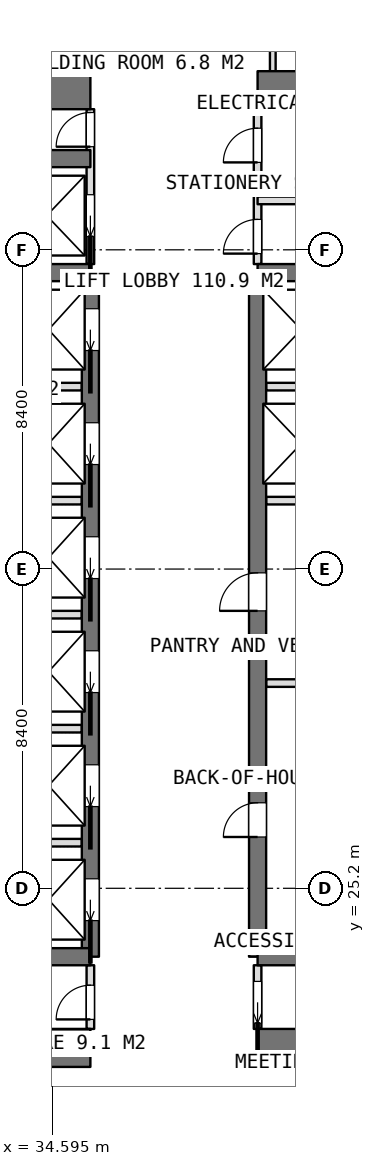
"""IFC4 building model, lengths in metres.
Left out: names, types, materials, properties, quantities, classifications, styles, units other than length and angle.
Written with IfcOpenShell. Run it as: python <this file> out.ifc"""

import sys

from ifc_helpers import new_model, si_unit, direction, frame, frame_2d, origin, place, context, subcontext, project, spatial, rectangle, extrude, element, fill, save


model = new_model("IFC4")
c1 = context("Model", 3, precision=1e-05, world=origin(), true_north=direction((0.0, 1.0)))
c2 = subcontext(c1, "Body", "Model", "MODEL_VIEW")
j1 = project(units=[si_unit("LENGTHUNIT", "METRE"), si_unit("PLANEANGLEUNIT", "RADIAN")], contexts=[c1])
p1 = place(None, origin())
s1 = spatial("IfcSite", under=j1, at=p1, CompositionType="ELEMENT")
p2 = place(p1, origin())
s2 = spatial("IfcBuilding", under=s1, at=p2, CompositionType="ELEMENT")
p3 = place(p2, frame((0.0, 0.0, 221.45)))
s3 = spatial("IfcBuildingStorey", under=s2, at=p3, CompositionType="ELEMENT", Elevation=221.45)
p4 = place(p3, frame((25.2, 21.0, 0.0), z_axis=(0.0, 0.0, 1.0), x_axis=(1.0, 0.0, 0.0)))
e1 = element("IfcWall", 1, at=p4, inside=s3, PredefinedType="SHEAR", context=c2, shape_type="SweptSolid", body=[
    extrude(rectangle(XDim=10.4, YDim=1.0, at=frame_2d((5.2, 0.0))), origin(), (0.0, 0.0, 1.0), 3.75),
])
p5 = place(p3, frame((40.0, 21.0, 0.0), z_axis=(0.0, 0.0, 1.0), x_axis=(1.0, 0.0, 0.0)))
e2 = element("IfcWall", 2, at=p5, inside=s3, PredefinedType="SHEAR", context=c2, shape_type="SweptSolid", body=[
    extrude(rectangle(XDim=10.4, YDim=1.0, at=frame_2d((5.2, 0.0))), origin(), (0.0, 0.0, 1.0), 3.75),
])
p6 = place(p3, frame((25.2, 46.2, 0.0), z_axis=(0.0, 0.0, 1.0), x_axis=(1.0, 0.0, 0.0)))
e3 = element("IfcWall", 3, at=p6, inside=s3, PredefinedType="SHEAR", context=c2, shape_type="SweptSolid", body=[
    extrude(rectangle(XDim=10.4, YDim=1.0, at=frame_2d((5.2, 0.0))), origin(), (0.0, 0.0, 1.0), 3.75),
])
p7 = place(p3, frame((40.0, 46.2, 0.0), z_axis=(0.0, 0.0, 1.0), x_axis=(1.0, 0.0, 0.0)))
e4 = element("IfcWall", 4, at=p7, inside=s3, PredefinedType="SHEAR", context=c2, shape_type="SweptSolid", body=[
    extrude(rectangle(XDim=10.4, YDim=1.0, at=frame_2d((5.2, 0.0))), origin(), (0.0, 0.0, 1.0), 3.75),
])
p8 = place(p3, frame((35.6, 23.4, 0.0), z_axis=(0.0, 0.0, 1.0), x_axis=(0.0, 1.0, 0.0)))
e5 = element("IfcWall", 5, at=p8, inside=s3, PredefinedType="SHEAR", context=c2, shape_type="SweptSolid", body=[
    extrude(rectangle(XDim=18.0, YDim=0.45, at=frame_2d((9.0, 0.0))), origin(), (0.0, 0.0, 1.0), 3.75),
])
p9 = place(p8, frame((0.95, 0.0, 0.0)))
e6 = element("IfcOpeningElement", 6, at=p9, cuts=e5, PredefinedType="OPENING", context=c2, shape_type="SweptSolid", body=[
    extrude(rectangle(XDim=1.1, YDim=2.1, at=frame_2d((0.55, 1.05))), frame((0.0, 0.235, 0.0), z_axis=(0.0, -1.0, 0.0), x_axis=(1.0, 0.0, 0.0)), (0.0, 0.0, 1.0), 0.47),
])
p10 = place(p8, frame((3.95, 0.0, 0.0)))
e7 = element("IfcOpeningElement", 7, at=p10, cuts=e5, PredefinedType="OPENING", context=c2, shape_type="SweptSolid", body=[
    extrude(rectangle(XDim=1.1, YDim=2.1, at=frame_2d((0.55, 1.05))), frame((0.0, 0.235, 0.0), z_axis=(0.0, -1.0, 0.0), x_axis=(1.0, 0.0, 0.0)), (0.0, 0.0, 1.0), 0.47),
])
p11 = place(p8, frame((6.95, 0.0, 0.0)))
e8 = element("IfcOpeningElement", 8, at=p11, cuts=e5, PredefinedType="OPENING", context=c2, shape_type="SweptSolid", body=[
    extrude(rectangle(XDim=1.1, YDim=2.1, at=frame_2d((0.55, 1.05))), frame((0.0, 0.235, 0.0), z_axis=(0.0, -1.0, 0.0), x_axis=(1.0, 0.0, 0.0)), (0.0, 0.0, 1.0), 0.47),
])
p12 = place(p8, frame((9.95, 0.0, 0.0)))
e9 = element("IfcOpeningElement", 9, at=p12, cuts=e5, PredefinedType="OPENING", context=c2, shape_type="SweptSolid", body=[
    extrude(rectangle(XDim=1.1, YDim=2.1, at=frame_2d((0.55, 1.05))), frame((0.0, 0.235, 0.0), z_axis=(0.0, -1.0, 0.0), x_axis=(1.0, 0.0, 0.0)), (0.0, 0.0, 1.0), 0.47),
])
p13 = place(p8, frame((12.95, 0.0, 0.0)))
e10 = element("IfcOpeningElement", 10, at=p13, cuts=e5, PredefinedType="OPENING", context=c2, shape_type="SweptSolid", body=[
    extrude(rectangle(XDim=1.1, YDim=2.1, at=frame_2d((0.55, 1.05))), frame((0.0, 0.235, 0.0), z_axis=(0.0, -1.0, 0.0), x_axis=(1.0, 0.0, 0.0)), (0.0, 0.0, 1.0), 0.47),
])
p14 = place(p8, frame((15.95, 0.0, 0.0)))
e11 = element("IfcOpeningElement", 11, at=p14, cuts=e5, PredefinedType="OPENING", context=c2, shape_type="SweptSolid", body=[
    extrude(rectangle(XDim=1.1, YDim=2.1, at=frame_2d((0.55, 1.05))), frame((0.0, 0.235, 0.0), z_axis=(0.0, -1.0, 0.0), x_axis=(1.0, 0.0, 0.0)), (0.0, 0.0, 1.0), 0.47),
])
p15 = place(p3, frame((40.0, 23.4, 0.0), z_axis=(0.0, 0.0, 1.0), x_axis=(0.0, 1.0, 0.0)))
e12 = element("IfcWall", 12, at=p15, inside=s3, PredefinedType="SHEAR", context=c2, shape_type="SweptSolid", body=[
    extrude(rectangle(XDim=18.0, YDim=0.45, at=frame_2d((9.0, 0.0))), origin(), (0.0, 0.0, 1.0), 3.75),
])
p16 = place(p15, frame((3.15, 0.0, 0.0)))
e13 = element("IfcOpeningElement", 13, at=p16, cuts=e12, PredefinedType="OPENING", context=c2, shape_type="SweptSolid", body=[
    extrude(rectangle(XDim=0.9, YDim=2.1, at=frame_2d((0.45, 1.05))), frame((0.0, 0.235, 0.0), z_axis=(0.0, -1.0, 0.0), x_axis=(1.0, 0.0, 0.0)), (0.0, 0.0, 1.0), 0.47),
])
p17 = place(p15, frame((9.1, 0.0, 0.0)))
e14 = element("IfcOpeningElement", 14, at=p17, cuts=e12, PredefinedType="OPENING", context=c2, shape_type="SweptSolid", body=[
    extrude(rectangle(XDim=1.0, YDim=2.1, at=frame_2d((0.5, 1.05))), frame((0.0, 0.235, 0.0), z_axis=(0.0, -1.0, 0.0), x_axis=(1.0, 0.0, 0.0)), (0.0, 0.0, 1.0), 0.47),
])
for number, where, z_axis, x_axis in (
    (15, (31.8, 23.4, 0.0), (0.0, 0.0, 1.0), (1.0, 0.0, 0.0)),
    (16, (31.8, 41.4, 0.0), (0.0, 0.0, 1.0), (1.0, 0.0, 0.0)),
    (17, (31.8, 44.4, 0.0), (0.0, 0.0, 1.0), (1.0, 0.0, 0.0)),
    (18, (40.0, 23.4, 0.0), (0.0, 0.0, 1.0), (1.0, 0.0, 0.0)),
    (19, (40.0, 41.4, 0.0), (0.0, 0.0, 1.0), (1.0, 0.0, 0.0)),
):
    element("IfcWall", number, at=place(p3, frame(where, z_axis=z_axis, x_axis=x_axis)), inside=s3, PredefinedType="SHEAR", context=c2, shape_type="SweptSolid", body=[
        extrude(rectangle(XDim=3.8, YDim=0.45, at=frame_2d((1.9, 0.0))), origin(), (0.0, 0.0, 1.0), 3.75),
    ])
for number, where, z_axis, x_axis in (
    (20, (32.025, 26.4, 0.0), (0.0, 0.0, 1.0), (1.0, 0.0, 0.0)),
    (21, (32.025, 29.4, 0.0), (0.0, 0.0, 1.0), (1.0, 0.0, 0.0)),
    (22, (32.025, 32.4, 0.0), (0.0, 0.0, 1.0), (1.0, 0.0, 0.0)),
    (23, (32.025, 35.4, 0.0), (0.0, 0.0, 1.0), (1.0, 0.0, 0.0)),
    (24, (32.025, 38.4, 0.0), (0.0, 0.0, 1.0), (1.0, 0.0, 0.0)),
):
    element("IfcWall", number, at=place(p3, frame(where, z_axis=z_axis, x_axis=x_axis)), inside=s3, PredefinedType="PARTITIONING", context=c2, shape_type="SweptSolid", body=[
        extrude(rectangle(XDim=3.35, YDim=0.2, at=frame_2d((1.675, 0.0))), origin(), (0.0, 0.0, 1.0), 3.5),
    ])
for number, where, z_axis, x_axis in (
    (25, (40.225, 35.4, 0.0), (0.0, 0.0, 1.0), (1.0, 0.0, 0.0)),
    (26, (40.225, 38.4, 0.0), (0.0, 0.0, 1.0), (1.0, 0.0, 0.0)),
):
    element("IfcWall", number, at=place(p3, frame(where, z_axis=z_axis, x_axis=x_axis)), inside=s3, PredefinedType="PARTITIONING", context=c2, shape_type="SweptSolid", body=[
        extrude(rectangle(XDim=3.35, YDim=0.2, at=frame_2d((1.675, 0.0))), origin(), (0.0, 0.0, 1.0), 3.5),
    ])
p18 = place(p3, frame((40.0, 21.5, 0.0), z_axis=(0.0, 0.0, 1.0), x_axis=(0.0, 1.0, 0.0)))
e27 = element("IfcWall", 27, at=p18, inside=s3, PredefinedType="PARTITIONING", context=c2, shape_type="SweptSolid", body=[
    extrude(rectangle(XDim=1.675, YDim=0.2, at=frame_2d((0.837, 0.0))), origin(), (0.0, 0.0, 1.0), 3.5),
])
p19 = place(p18, frame((0.15, 0.0, 0.0)))
e28 = element("IfcOpeningElement", 28, at=p19, cuts=e27, PredefinedType="OPENING", context=c2, shape_type="SweptSolid", body=[
    extrude(rectangle(XDim=1.1, YDim=2.1, at=frame_2d((0.55, 1.05))), frame((0.0, 0.11, 0.0), z_axis=(0.0, -1.0, 0.0), x_axis=(1.0, 0.0, 0.0)), (0.0, 0.0, 1.0), 0.22),
])
p20 = place(p3, frame((40.0, 41.625, 0.0), z_axis=(0.0, 0.0, 1.0), x_axis=(0.0, 1.0, 0.0)))
e29 = element("IfcWall", 29, at=p20, inside=s3, PredefinedType="PARTITIONING", context=c2, shape_type="SweptSolid", body=[
    extrude(rectangle(XDim=4.075, YDim=0.2, at=frame_2d((2.038, 0.0))), origin(), (0.0, 0.0, 1.0), 3.5),
])
p21 = place(p20, frame((2.675, 0.0, 0.0)))
e30 = element("IfcOpeningElement", 30, at=p21, cuts=e29, PredefinedType="OPENING", context=c2, shape_type="SweptSolid", body=[
    extrude(rectangle(XDim=0.9, YDim=2.1, at=frame_2d((0.45, 1.05))), frame((0.0, 0.11, 0.0), z_axis=(0.0, -1.0, 0.0), x_axis=(1.0, 0.0, 0.0)), (0.0, 0.0, 1.0), 0.22),
])
p22 = place(p20, frame((0.275, 0.0, 0.0)))
e31 = element("IfcOpeningElement", 31, at=p22, cuts=e29, PredefinedType="OPENING", context=c2, shape_type="SweptSolid", body=[
    extrude(rectangle(XDim=0.9, YDim=2.1, at=frame_2d((0.45, 1.05))), frame((0.0, 0.11, 0.0), z_axis=(0.0, -1.0, 0.0), x_axis=(1.0, 0.0, 0.0)), (0.0, 0.0, 1.0), 0.22),
])
p23 = place(p3, frame((35.6, 41.625, 0.0), z_axis=(0.0, 0.0, 1.0), x_axis=(0.0, 1.0, 0.0)))
e32 = element("IfcWall", 32, at=p23, inside=s3, PredefinedType="PARTITIONING", context=c2, shape_type="SweptSolid", body=[
    extrude(rectangle(XDim=4.075, YDim=0.2, at=frame_2d((2.038, 0.0))), origin(), (0.0, 0.0, 1.0), 3.5),
])
p24 = place(p23, frame((3.088, 0.0, 0.0)))
e33 = element("IfcOpeningElement", 33, at=p24, cuts=e32, PredefinedType="OPENING", context=c2, shape_type="SweptSolid", body=[
    extrude(rectangle(XDim=0.9, YDim=2.1, at=frame_2d((0.45, 1.05))), frame((0.0, 0.11, 0.0), z_axis=(0.0, -1.0, 0.0), x_axis=(1.0, 0.0, 0.0)), (0.0, 0.0, 1.0), 0.22),
])
p25 = place(p23, frame((0.725, 0.0, 0.0)))
e34 = element("IfcOpeningElement", 34, at=p25, cuts=e32, PredefinedType="OPENING", context=c2, shape_type="SweptSolid", body=[
    extrude(rectangle(XDim=1.1, YDim=2.1, at=frame_2d((0.55, 1.05))), frame((0.0, 0.11, 0.0), z_axis=(0.0, -1.0, 0.0), x_axis=(1.0, 0.0, 0.0)), (0.0, 0.0, 1.0), 0.22),
])
p26 = place(p3, frame((35.6, 21.5, 0.0), z_axis=(0.0, 0.0, 1.0), x_axis=(0.0, 1.0, 0.0)))
e35 = element("IfcWall", 35, at=p26, inside=s3, PredefinedType="PARTITIONING", context=c2, shape_type="SweptSolid", body=[
    extrude(rectangle(XDim=1.675, YDim=0.2, at=frame_2d((0.837, 0.0))), origin(), (0.0, 0.0, 1.0), 3.5),
])
p27 = place(p26, frame((0.25, 0.0, 0.0)))
e36 = element("IfcOpeningElement", 36, at=p27, cuts=e35, PredefinedType="OPENING", context=c2, shape_type="SweptSolid", body=[
    extrude(rectangle(XDim=0.9, YDim=2.1, at=frame_2d((0.45, 1.05))), frame((0.0, 0.11, 0.0), z_axis=(0.0, -1.0, 0.0), x_axis=(1.0, 0.0, 0.0)), (0.0, 0.0, 1.0), 0.22),
])
p28 = place(p3, frame((40.225, 30.6, 0.0), z_axis=(0.0, 0.0, 1.0), x_axis=(1.0, 0.0, 0.0)))
e37 = element("IfcWall", 37, at=p28, inside=s3, PredefinedType="PARTITIONING", context=c2, shape_type="SweptSolid", body=[
    extrude(rectangle(XDim=3.35, YDim=0.2, at=frame_2d((1.675, 0.0))), origin(), (0.0, 0.0, 1.0), 3.5),
])
p29 = place(p3, frame((40.0, 43.3, 0.0), z_axis=(0.0, 0.0, 1.0), x_axis=(1.0, 0.0, 0.0)))
e38 = element("IfcWall", 38, at=p29, inside=s3, PredefinedType="PARTITIONING", context=c2, shape_type="SweptSolid", body=[
    extrude(rectangle(XDim=3.575, YDim=0.2, at=frame_2d((1.788, 0.0))), origin(), (0.0, 0.0, 1.0), 3.5),
])
for number, where, z_axis, x_axis in (
    (39, (40.4, 46.7, 0.0), (0.0, 0.0, 1.0), (0.0, 1.0, 0.0)),
    (40, (35.2, 46.7, 0.0), (0.0, 0.0, 1.0), (0.0, 1.0, 0.0)),
):
    element("IfcWall", number, at=place(p3, frame(where, z_axis=z_axis, x_axis=x_axis)), inside=s3, PredefinedType="PARTITIONING", context=c2, shape_type="SweptSolid", body=[
        extrude(rectangle(XDim=2.625, YDim=0.15, at=frame_2d((1.312, 0.0))), origin(), (0.0, 0.0, 1.0), 3.5),
    ])
p30 = place(p19, origin())
e41 = element("IfcDoor", 41, at=p30, inside=s3, OperationType="SLIDING_TO_LEFT", PredefinedType="DOOR", context=c2, shape_type="SweptSolid", body=[
    extrude(rectangle(XDim=1.1, YDim=2.1, at=frame_2d((0.55, 1.05))), frame((0.0, 0.025, 0.0), z_axis=(0.0, -1.0, 0.0), x_axis=(1.0, 0.0, 0.0)), (0.0, 0.0, 1.0), 0.05),
])
fill(e28, e41)
p31 = place(p27, origin())
e42 = element("IfcDoor", 42, at=p31, inside=s3, OperationType="SINGLE_SWING_LEFT", PredefinedType="DOOR", context=c2, shape_type="SweptSolid", body=[
    extrude(rectangle(XDim=0.9, YDim=2.1, at=frame_2d((0.45, 1.05))), frame((0.0, 0.025, 0.0), z_axis=(0.0, -1.0, 0.0), x_axis=(1.0, 0.0, 0.0)), (0.0, 0.0, 1.0), 0.05),
])
fill(e36, e42)
p32 = place(p21, origin())
e43 = element("IfcDoor", 43, at=p32, inside=s3, OperationType="SINGLE_SWING_LEFT", PredefinedType="DOOR", context=c2, shape_type="SweptSolid", body=[
    extrude(rectangle(XDim=0.9, YDim=2.1, at=frame_2d((0.45, 1.05))), frame((0.0, 0.025, 0.0), z_axis=(0.0, -1.0, 0.0), x_axis=(1.0, 0.0, 0.0)), (0.0, 0.0, 1.0), 0.05),
])
fill(e30, e43)
p33 = place(p22, origin())
e44 = element("IfcDoor", 44, at=p33, inside=s3, OperationType="SINGLE_SWING_LEFT", PredefinedType="DOOR", context=c2, shape_type="SweptSolid", body=[
    extrude(rectangle(XDim=0.9, YDim=2.1, at=frame_2d((0.45, 1.05))), frame((0.0, 0.025, 0.0), z_axis=(0.0, -1.0, 0.0), x_axis=(1.0, 0.0, 0.0)), (0.0, 0.0, 1.0), 0.05),
])
fill(e31, e44)
p34 = place(p16, origin())
e45 = element("IfcDoor", 45, at=p34, inside=s3, OperationType="SINGLE_SWING_LEFT", PredefinedType="DOOR", context=c2, shape_type="SweptSolid", body=[
    extrude(rectangle(XDim=0.9, YDim=2.1, at=frame_2d((0.45, 1.05))), frame((0.0, 0.025, 0.0), z_axis=(0.0, -1.0, 0.0), x_axis=(1.0, 0.0, 0.0)), (0.0, 0.0, 1.0), 0.05),
])
fill(e13, e45)
p35 = place(p17, origin())
e46 = element("IfcDoor", 46, at=p35, inside=s3, OperationType="SINGLE_SWING_LEFT", PredefinedType="DOOR", context=c2, shape_type="SweptSolid", body=[
    extrude(rectangle(XDim=1.0, YDim=2.1, at=frame_2d((0.5, 1.05))), frame((0.0, 0.025, 0.0), z_axis=(0.0, -1.0, 0.0), x_axis=(1.0, 0.0, 0.0)), (0.0, 0.0, 1.0), 0.05),
])
fill(e14, e46)
p36 = place(p24, origin())
e47 = element("IfcDoor", 47, at=p36, inside=s3, OperationType="SINGLE_SWING_LEFT", PredefinedType="DOOR", context=c2, shape_type="SweptSolid", body=[
    extrude(rectangle(XDim=0.9, YDim=2.1, at=frame_2d((0.45, 1.05))), frame((0.0, 0.025, 0.0), z_axis=(0.0, -1.0, 0.0), x_axis=(1.0, 0.0, 0.0)), (0.0, 0.0, 1.0), 0.05),
])
fill(e33, e47)
p37 = place(p9, origin())
e48 = element("IfcDoor", 48, at=p37, inside=s3, OperationType="SLIDING_TO_LEFT", PredefinedType="USERDEFINED", context=c2, shape_type="SweptSolid", body=[
    extrude(rectangle(XDim=1.1, YDim=2.1, at=frame_2d((0.55, 1.05))), frame((0.0, 0.025, 0.0), z_axis=(0.0, -1.0, 0.0), x_axis=(1.0, 0.0, 0.0)), (0.0, 0.0, 1.0), 0.05),
])
fill(e6, e48)
p38 = place(p10, origin())
e49 = element("IfcDoor", 49, at=p38, inside=s3, OperationType="SLIDING_TO_LEFT", PredefinedType="USERDEFINED", context=c2, shape_type="SweptSolid", body=[
    extrude(rectangle(XDim=1.1, YDim=2.1, at=frame_2d((0.55, 1.05))), frame((0.0, 0.025, 0.0), z_axis=(0.0, -1.0, 0.0), x_axis=(1.0, 0.0, 0.0)), (0.0, 0.0, 1.0), 0.05),
])
fill(e7, e49)
p39 = place(p11, origin())
e50 = element("IfcDoor", 50, at=p39, inside=s3, OperationType="SLIDING_TO_LEFT", PredefinedType="USERDEFINED", context=c2, shape_type="SweptSolid", body=[
    extrude(rectangle(XDim=1.1, YDim=2.1, at=frame_2d((0.55, 1.05))), frame((0.0, 0.025, 0.0), z_axis=(0.0, -1.0, 0.0), x_axis=(1.0, 0.0, 0.0)), (0.0, 0.0, 1.0), 0.05),
])
fill(e8, e50)
p40 = place(p12, origin())
e51 = element("IfcDoor", 51, at=p40, inside=s3, OperationType="SLIDING_TO_LEFT", PredefinedType="USERDEFINED", context=c2, shape_type="SweptSolid", body=[
    extrude(rectangle(XDim=1.1, YDim=2.1, at=frame_2d((0.55, 1.05))), frame((0.0, 0.025, 0.0), z_axis=(0.0, -1.0, 0.0), x_axis=(1.0, 0.0, 0.0)), (0.0, 0.0, 1.0), 0.05),
])
fill(e9, e51)
p41 = place(p13, origin())
e52 = element("IfcDoor", 52, at=p41, inside=s3, OperationType="SLIDING_TO_LEFT", PredefinedType="USERDEFINED", context=c2, shape_type="SweptSolid", body=[
    extrude(rectangle(XDim=1.1, YDim=2.1, at=frame_2d((0.55, 1.05))), frame((0.0, 0.025, 0.0), z_axis=(0.0, -1.0, 0.0), x_axis=(1.0, 0.0, 0.0)), (0.0, 0.0, 1.0), 0.05),
])
fill(e10, e52)
p42 = place(p14, origin())
e53 = element("IfcDoor", 53, at=p42, inside=s3, OperationType="SLIDING_TO_LEFT", PredefinedType="USERDEFINED", context=c2, shape_type="SweptSolid", body=[
    extrude(rectangle(XDim=1.1, YDim=2.1, at=frame_2d((0.55, 1.05))), frame((0.0, 0.025, 0.0), z_axis=(0.0, -1.0, 0.0), x_axis=(1.0, 0.0, 0.0)), (0.0, 0.0, 1.0), 0.05),
])
fill(e11, e53)
p43 = place(p25, origin())
e54 = element("IfcDoor", 54, at=p43, inside=s3, OperationType="SLIDING_TO_LEFT", PredefinedType="USERDEFINED", context=c2, shape_type="SweptSolid", body=[
    extrude(rectangle(XDim=1.1, YDim=2.1, at=frame_2d((0.55, 1.05))), frame((0.0, 0.025, 0.0), z_axis=(0.0, -1.0, 0.0), x_axis=(1.0, 0.0, 0.0)), (0.0, 0.0, 1.0), 0.05),
])
fill(e34, e54)
save(model, sys.argv[1])
